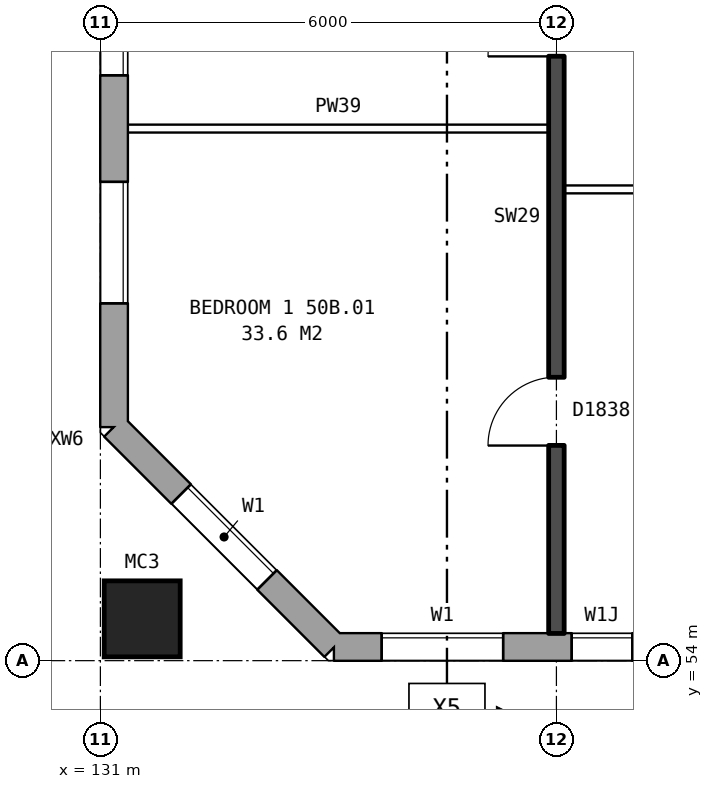
"""IFC4 building model, lengths in metres.
Left out: names, types, materials, properties, quantities, classifications, styles, units other than length and angle.
Written with IfcOpenShell. Run it as: python <this file> out.ifc"""

import sys

from ifc_helpers import new_model, si_unit, direction, frame, frame_2d, origin, origin_2d, place, context, subcontext, project, spatial, rectangle, hollow_rectangle, extrude, element, fill, save


model = new_model("IFC4")
c1 = context("Model", 3, precision=1e-05, world=origin(), true_north=direction((0.0, 1.0)))
c2 = subcontext(c1, "Body", "Model", "MODEL_VIEW")
j1 = project(units=[si_unit("LENGTHUNIT", "METRE"), si_unit("PLANEANGLEUNIT", "RADIAN")], contexts=[c1])
p1 = place(None, origin())
s1 = spatial("IfcSite", under=j1, at=p1, CompositionType="ELEMENT")
p2 = place(p1, origin())
s2 = spatial("IfcBuilding", under=s1, at=p2, CompositionType="ELEMENT")
p3 = place(p2, frame((0.0, 0.0, 178.9)))
s3 = spatial("IfcBuildingStorey", under=s2, at=p3, CompositionType="ELEMENT", Elevation=178.9)
p4 = place(p3, frame((131.55, 54.55, 0.0), z_axis=(0.0, 0.0, 1.0), x_axis=(1.0, 0.0, 0.0)))
e1 = element("IfcColumn", 1, at=p4, inside=s3, PredefinedType="COLUMN", context=c2, shape_type="SweptSolid", body=[
    extrude(hollow_rectangle(XDim=1.0, YDim=1.0, WallThickness=0.055, at=origin_2d()), origin(), (0.0, 0.0, 1.0), 3.1),
])
p5 = place(p3, frame((131.18, 57.075, 0.0), z_axis=(0.0, 0.0, 1.0), x_axis=(0.707106781187, -0.707106781187, 0.0)))
e2 = element("IfcWall", 2, at=p5, inside=s3, PredefinedType="STANDARD", context=c2, shape_type="SweptSolid", body=[
    extrude(rectangle(XDim=4.094, YDim=0.36, at=frame_2d((2.047, 0.0))), origin(), (0.0, 0.0, 1.0), 2.85),
])
p6 = place(p5, frame((1.247, 0.0, 0.8)))
e3 = element("IfcOpeningElement", 3, at=p6, cuts=e2, PredefinedType="OPENING", context=c2, shape_type="SweptSolid", body=[
    extrude(rectangle(XDim=1.6, YDim=1.8, at=frame_2d((0.8, 0.9))), frame((0.0, 0.19, 0.0), z_axis=(0.0, -1.0, 0.0), x_axis=(1.0, 0.0, 0.0)), (0.0, 0.0, 1.0), 0.38),
])
p7 = place(p3, frame((134.075, 54.18, 0.0), z_axis=(0.0, 0.0, 1.0), x_axis=(1.0, 0.0, 0.0)))
e4 = element("IfcWall", 4, at=p7, inside=s3, PredefinedType="STANDARD", context=c2, shape_type="SweptSolid", body=[
    extrude(rectangle(XDim=33.101, YDim=0.36, at=frame_2d((16.55, 0.0))), origin(), (0.0, 0.0, 1.0), 2.85),
])
p8 = place(p7, frame((0.625, 0.0, 0.8)))
e5 = element("IfcOpeningElement", 5, at=p8, cuts=e4, PredefinedType="OPENING", context=c2, shape_type="SweptSolid", body=[
    extrude(rectangle(XDim=1.6, YDim=1.8, at=frame_2d((0.8, 0.9))), frame((0.0, 0.19, 0.0), z_axis=(0.0, -1.0, 0.0), x_axis=(1.0, 0.0, 0.0)), (0.0, 0.0, 1.0), 0.38),
])
p9 = place(p7, frame((3.125, 0.0, 1.1)))
e6 = element("IfcOpeningElement", 6, at=p9, cuts=e4, PredefinedType="OPENING", context=c2, shape_type="SweptSolid", body=[
    extrude(rectangle(XDim=0.8, YDim=1.5, at=frame_2d((0.4, 0.75))), frame((0.0, 0.19, 0.0), z_axis=(0.0, -1.0, 0.0), x_axis=(1.0, 0.0, 0.0)), (0.0, 0.0, 1.0), 0.38),
])
p10 = place(p7, frame((6.625, 0.0, 0.8)))
e7 = element("IfcOpeningElement", 7, at=p10, cuts=e4, PredefinedType="OPENING", context=c2, shape_type="SweptSolid", body=[
    extrude(rectangle(XDim=1.6, YDim=1.8, at=frame_2d((0.8, 0.9))), frame((0.0, 0.19, 0.0), z_axis=(0.0, -1.0, 0.0), x_axis=(1.0, 0.0, 0.0)), (0.0, 0.0, 1.0), 0.38),
])
p11 = place(p7, frame((9.625, 0.0, 0.8)))
e8 = element("IfcOpeningElement", 8, at=p11, cuts=e4, PredefinedType="OPENING", context=c2, shape_type="SweptSolid", body=[
    extrude(rectangle(XDim=1.6, YDim=1.8, at=frame_2d((0.8, 0.9))), frame((0.0, 0.19, 0.0), z_axis=(0.0, -1.0, 0.0), x_axis=(1.0, 0.0, 0.0)), (0.0, 0.0, 1.0), 0.38),
])
p12 = place(p7, frame((12.625, 0.0, 0.8)))
e9 = element("IfcOpeningElement", 9, at=p12, cuts=e4, PredefinedType="OPENING", context=c2, shape_type="SweptSolid", body=[
    extrude(rectangle(XDim=1.6, YDim=1.8, at=frame_2d((0.8, 0.9))), frame((0.0, 0.19, 0.0), z_axis=(0.0, -1.0, 0.0), x_axis=(1.0, 0.0, 0.0)), (0.0, 0.0, 1.0), 0.38),
])
p13 = place(p7, frame((15.625, 0.0, 0.8)))
e10 = element("IfcOpeningElement", 10, at=p13, cuts=e4, PredefinedType="OPENING", context=c2, shape_type="SweptSolid", body=[
    extrude(rectangle(XDim=1.6, YDim=1.8, at=frame_2d((0.8, 0.9))), frame((0.0, 0.19, 0.0), z_axis=(0.0, -1.0, 0.0), x_axis=(1.0, 0.0, 0.0)), (0.0, 0.0, 1.0), 0.38),
])
p14 = place(p7, frame((18.625, 0.0, 0.8)))
e11 = element("IfcOpeningElement", 11, at=p14, cuts=e4, PredefinedType="OPENING", context=c2, shape_type="SweptSolid", body=[
    extrude(rectangle(XDim=1.6, YDim=1.8, at=frame_2d((0.8, 0.9))), frame((0.0, 0.19, 0.0), z_axis=(0.0, -1.0, 0.0), x_axis=(1.0, 0.0, 0.0)), (0.0, 0.0, 1.0), 0.38),
])
p15 = place(p7, frame((21.625, 0.0, 0.8)))
e12 = element("IfcOpeningElement", 12, at=p15, cuts=e4, PredefinedType="OPENING", context=c2, shape_type="SweptSolid", body=[
    extrude(rectangle(XDim=1.6, YDim=1.8, at=frame_2d((0.8, 0.9))), frame((0.0, 0.19, 0.0), z_axis=(0.0, -1.0, 0.0), x_axis=(1.0, 0.0, 0.0)), (0.0, 0.0, 1.0), 0.38),
])
p16 = place(p7, frame((24.625, 0.0, 0.8)))
e13 = element("IfcOpeningElement", 13, at=p16, cuts=e4, PredefinedType="OPENING", context=c2, shape_type="SweptSolid", body=[
    extrude(rectangle(XDim=1.6, YDim=1.8, at=frame_2d((0.8, 0.9))), frame((0.0, 0.19, 0.0), z_axis=(0.0, -1.0, 0.0), x_axis=(1.0, 0.0, 0.0)), (0.0, 0.0, 1.0), 0.38),
])
p17 = place(p7, frame((28.625, 0.0, 1.7)))
e14 = element("IfcOpeningElement", 14, at=p17, cuts=e4, PredefinedType="OPENING", context=c2, shape_type="SweptSolid", body=[
    extrude(rectangle(XDim=0.6, YDim=0.9, at=frame_2d((0.3, 0.45))), frame((0.0, 0.19, 0.0), z_axis=(0.0, -1.0, 0.0), x_axis=(1.0, 0.0, 0.0)), (0.0, 0.0, 1.0), 0.38),
])
p18 = place(p7, frame((30.625, 0.0, 0.8)))
e15 = element("IfcOpeningElement", 15, at=p18, cuts=e4, PredefinedType="OPENING", context=c2, shape_type="SweptSolid", body=[
    extrude(rectangle(XDim=1.6, YDim=1.8, at=frame_2d((0.8, 0.9))), frame((0.0, 0.19, 0.0), z_axis=(0.0, -1.0, 0.0), x_axis=(1.0, 0.0, 0.0)), (0.0, 0.0, 1.0), 0.38),
])
p19 = place(p7, frame((5.475, 0.0, 0.8)))
e16 = element("IfcOpeningElement", 16, at=p19, cuts=e4, PredefinedType="OPENING", context=c2, shape_type="SweptSolid", body=[
    extrude(rectangle(XDim=0.8, YDim=0.9, at=frame_2d((0.4, 0.45))), frame((0.0, 0.19, 0.0), z_axis=(0.0, -1.0, 0.0), x_axis=(1.0, 0.0, 0.0)), (0.0, 0.0, 1.0), 0.38),
])
p20 = place(p7, frame((29.525, 0.0, 0.8)))
e17 = element("IfcOpeningElement", 17, at=p20, cuts=e4, PredefinedType="OPENING", context=c2, shape_type="SweptSolid", body=[
    extrude(rectangle(XDim=0.8, YDim=1.8, at=frame_2d((0.4, 0.9))), frame((0.0, 0.19, 0.0), z_axis=(0.0, -1.0, 0.0), x_axis=(1.0, 0.0, 0.0)), (0.0, 0.0, 1.0), 0.38),
])
p21 = place(p3, frame((131.18, 82.925, 0.0), z_axis=(0.0, 0.0, 1.0), x_axis=(0.0, -1.0, 0.0)))
e18 = element("IfcWall", 18, at=p21, inside=s3, PredefinedType="STANDARD", context=c2, shape_type="SweptSolid", body=[
    extrude(rectangle(XDim=25.851, YDim=0.36, at=frame_2d((12.925, 0.0))), origin(), (0.0, 0.0, 1.0), 2.85),
])
p22 = place(p21, frame((1.625, 0.0, 0.8)))
e19 = element("IfcOpeningElement", 19, at=p22, cuts=e18, PredefinedType="OPENING", context=c2, shape_type="SweptSolid", body=[
    extrude(rectangle(XDim=1.6, YDim=1.8, at=frame_2d((0.8, 0.9))), frame((0.0, 0.19, 0.0), z_axis=(0.0, -1.0, 0.0), x_axis=(1.0, 0.0, 0.0)), (0.0, 0.0, 1.0), 0.38),
])
p23 = place(p21, frame((4.625, 0.0, 0.8)))
e20 = element("IfcOpeningElement", 20, at=p23, cuts=e18, PredefinedType="OPENING", context=c2, shape_type="SweptSolid", body=[
    extrude(rectangle(XDim=1.6, YDim=1.8, at=frame_2d((0.8, 0.9))), frame((0.0, 0.19, 0.0), z_axis=(0.0, -1.0, 0.0), x_axis=(1.0, 0.0, 0.0)), (0.0, 0.0, 1.0), 0.38),
])
p24 = place(p21, frame((19.625, 0.0, 0.8)))
e21 = element("IfcOpeningElement", 21, at=p24, cuts=e18, PredefinedType="OPENING", context=c2, shape_type="SweptSolid", body=[
    extrude(rectangle(XDim=1.6, YDim=1.8, at=frame_2d((0.8, 0.9))), frame((0.0, 0.19, 0.0), z_axis=(0.0, -1.0, 0.0), x_axis=(1.0, 0.0, 0.0)), (0.0, 0.0, 1.0), 0.38),
])
p25 = place(p21, frame((22.625, 0.0, 0.8)))
e22 = element("IfcOpeningElement", 22, at=p25, cuts=e18, PredefinedType="OPENING", context=c2, shape_type="SweptSolid", body=[
    extrude(rectangle(XDim=1.6, YDim=1.8, at=frame_2d((0.8, 0.9))), frame((0.0, 0.19, 0.0), z_axis=(0.0, -1.0, 0.0), x_axis=(1.0, 0.0, 0.0)), (0.0, 0.0, 1.0), 0.38),
])
p26 = place(p3, frame((137.1, 60.2, 0.0), z_axis=(0.0, 0.0, 1.0), x_axis=(1.0, 0.0, 0.0)))
e23 = element("IfcWall", 23, at=p26, inside=s3, PredefinedType="PARTITIONING", context=c2, shape_type="SweptSolid", body=[
    extrude(rectangle(XDim=5.8, YDim=0.1, at=frame_2d((2.9, 0.0))), origin(), (0.0, 0.0, 1.0), 2.85),
])
p27 = place(p26, frame((1.3, 0.0, 0.0)))
e24 = element("IfcOpeningElement", 24, at=p27, cuts=e23, PredefinedType="OPENING", context=c2, shape_type="SweptSolid", body=[
    extrude(rectangle(XDim=0.9, YDim=2.1, at=frame_2d((0.45, 1.05))), frame((0.0, 0.06, 0.0), z_axis=(0.0, -1.0, 0.0), x_axis=(1.0, 0.0, 0.0)), (0.0, 0.0, 1.0), 0.12),
])
p28 = place(p26, frame((4.2, 0.0, 0.0)))
e25 = element("IfcOpeningElement", 25, at=p28, cuts=e23, PredefinedType="OPENING", context=c2, shape_type="SweptSolid", body=[
    extrude(rectangle(XDim=0.9, YDim=2.1, at=frame_2d((0.45, 1.05))), frame((0.0, 0.06, 0.0), z_axis=(0.0, -1.0, 0.0), x_axis=(1.0, 0.0, 0.0)), (0.0, 0.0, 1.0), 0.12),
])
p29 = place(p3, frame((131.36, 61.0, 0.0), z_axis=(0.0, 0.0, 1.0), x_axis=(1.0, 0.0, 0.0)))
e26 = element("IfcWall", 26, at=p29, inside=s3, PredefinedType="PARTITIONING", context=c2, shape_type="SweptSolid", body=[
    extrude(rectangle(XDim=5.54, YDim=0.1, at=frame_2d((2.77, 0.0))), origin(), (0.0, 0.0, 1.0), 2.85),
])
p30 = place(p3, frame((137.0, 54.36, 0.0), z_axis=(0.0, 0.0, 1.0), x_axis=(0.0, 1.0, 0.0)))
e27 = element("IfcWall", 27, at=p30, inside=s3, PredefinedType="SOLIDWALL", context=c2, shape_type="SweptSolid", body=[
    extrude(rectangle(XDim=9.44, YDim=0.2, at=frame_2d((4.72, 0.0))), origin(), (0.0, 0.0, 1.0), 2.85),
])
p31 = place(p30, frame((2.47, 0.0, 0.0)))
e28 = element("IfcOpeningElement", 28, at=p31, cuts=e27, PredefinedType="OPENING", context=c2, shape_type="SweptSolid", body=[
    extrude(rectangle(XDim=0.9, YDim=2.1, at=frame_2d((0.45, 1.05))), frame((0.0, 0.11, 0.0), z_axis=(0.0, -1.0, 0.0), x_axis=(1.0, 0.0, 0.0)), (0.0, 0.0, 1.0), 0.22),
])
p32 = place(p30, frame((7.59, 0.0, 0.0)))
e29 = element("IfcOpeningElement", 29, at=p32, cuts=e27, PredefinedType="OPENING", context=c2, shape_type="SweptSolid", body=[
    extrude(rectangle(XDim=0.9, YDim=2.1, at=frame_2d((0.45, 1.05))), frame((0.0, 0.11, 0.0), z_axis=(0.0, -1.0, 0.0), x_axis=(1.0, 0.0, 0.0)), (0.0, 0.0, 1.0), 0.22),
])
p33 = place(p6, origin())
e30 = element("IfcWindow", 30, at=p33, inside=s3, PartitioningType="SINGLE_PANEL", PredefinedType="WINDOW", context=c2, shape_type="SweptSolid", body=[
    extrude(rectangle(XDim=1.6, YDim=1.8, at=frame_2d((0.8, 0.9))), frame((0.0, 0.15, 0.0), z_axis=(0.0, -1.0, 0.0), x_axis=(1.0, 0.0, 0.0)), (0.0, 0.0, 1.0), 0.06),
])
fill(e3, e30)
p34 = place(p8, origin())
e31 = element("IfcWindow", 31, at=p34, inside=s3, PartitioningType="SINGLE_PANEL", PredefinedType="WINDOW", context=c2, shape_type="SweptSolid", body=[
    extrude(rectangle(XDim=1.6, YDim=1.8, at=frame_2d((0.8, 0.9))), frame((0.0, 0.15, 0.0), z_axis=(0.0, -1.0, 0.0), x_axis=(1.0, 0.0, 0.0)), (0.0, 0.0, 1.0), 0.06),
])
fill(e5, e31)
p35 = place(p9, origin())
e32 = element("IfcWindow", 32, at=p35, inside=s3, PartitioningType="SINGLE_PANEL", PredefinedType="WINDOW", context=c2, shape_type="SweptSolid", body=[
    extrude(rectangle(XDim=0.8, YDim=1.5, at=frame_2d((0.4, 0.75))), frame((0.0, 0.15, 0.0), z_axis=(0.0, -1.0, 0.0), x_axis=(1.0, 0.0, 0.0)), (0.0, 0.0, 1.0), 0.06),
])
fill(e6, e32)
p36 = place(p24, origin())
e33 = element("IfcWindow", 33, at=p36, inside=s3, PartitioningType="SINGLE_PANEL", PredefinedType="WINDOW", context=c2, shape_type="SweptSolid", body=[
    extrude(rectangle(XDim=1.6, YDim=1.8, at=frame_2d((0.8, 0.9))), frame((0.0, 0.15, 0.0), z_axis=(0.0, -1.0, 0.0), x_axis=(1.0, 0.0, 0.0)), (0.0, 0.0, 1.0), 0.06),
])
fill(e21, e33)
p37 = place(p25, origin())
e34 = element("IfcWindow", 34, at=p37, inside=s3, PartitioningType="SINGLE_PANEL", PredefinedType="WINDOW", context=c2, shape_type="SweptSolid", body=[
    extrude(rectangle(XDim=1.6, YDim=1.8, at=frame_2d((0.8, 0.9))), frame((0.0, 0.15, 0.0), z_axis=(0.0, -1.0, 0.0), x_axis=(1.0, 0.0, 0.0)), (0.0, 0.0, 1.0), 0.06),
])
fill(e22, e34)
p38 = place(p31, origin())
e35 = element("IfcDoor", 35, at=p38, inside=s3, OperationType="SINGLE_SWING_LEFT", PredefinedType="DOOR", context=c2, shape_type="SweptSolid", body=[
    extrude(rectangle(XDim=0.9, YDim=2.1, at=frame_2d((0.45, 1.05))), frame((0.0, 0.025, 0.0), z_axis=(0.0, -1.0, 0.0), x_axis=(1.0, 0.0, 0.0)), (0.0, 0.0, 1.0), 0.05),
])
fill(e28, e35)
p39 = place(p32, origin())
e36 = element("IfcDoor", 36, at=p39, inside=s3, OperationType="SINGLE_SWING_LEFT", PredefinedType="DOOR", context=c2, shape_type="SweptSolid", body=[
    extrude(rectangle(XDim=0.9, YDim=2.1, at=frame_2d((0.45, 1.05))), frame((0.0, 0.025, 0.0), z_axis=(0.0, -1.0, 0.0), x_axis=(1.0, 0.0, 0.0)), (0.0, 0.0, 1.0), 0.05),
])
fill(e29, e36)
save(model, sys.argv[1])
